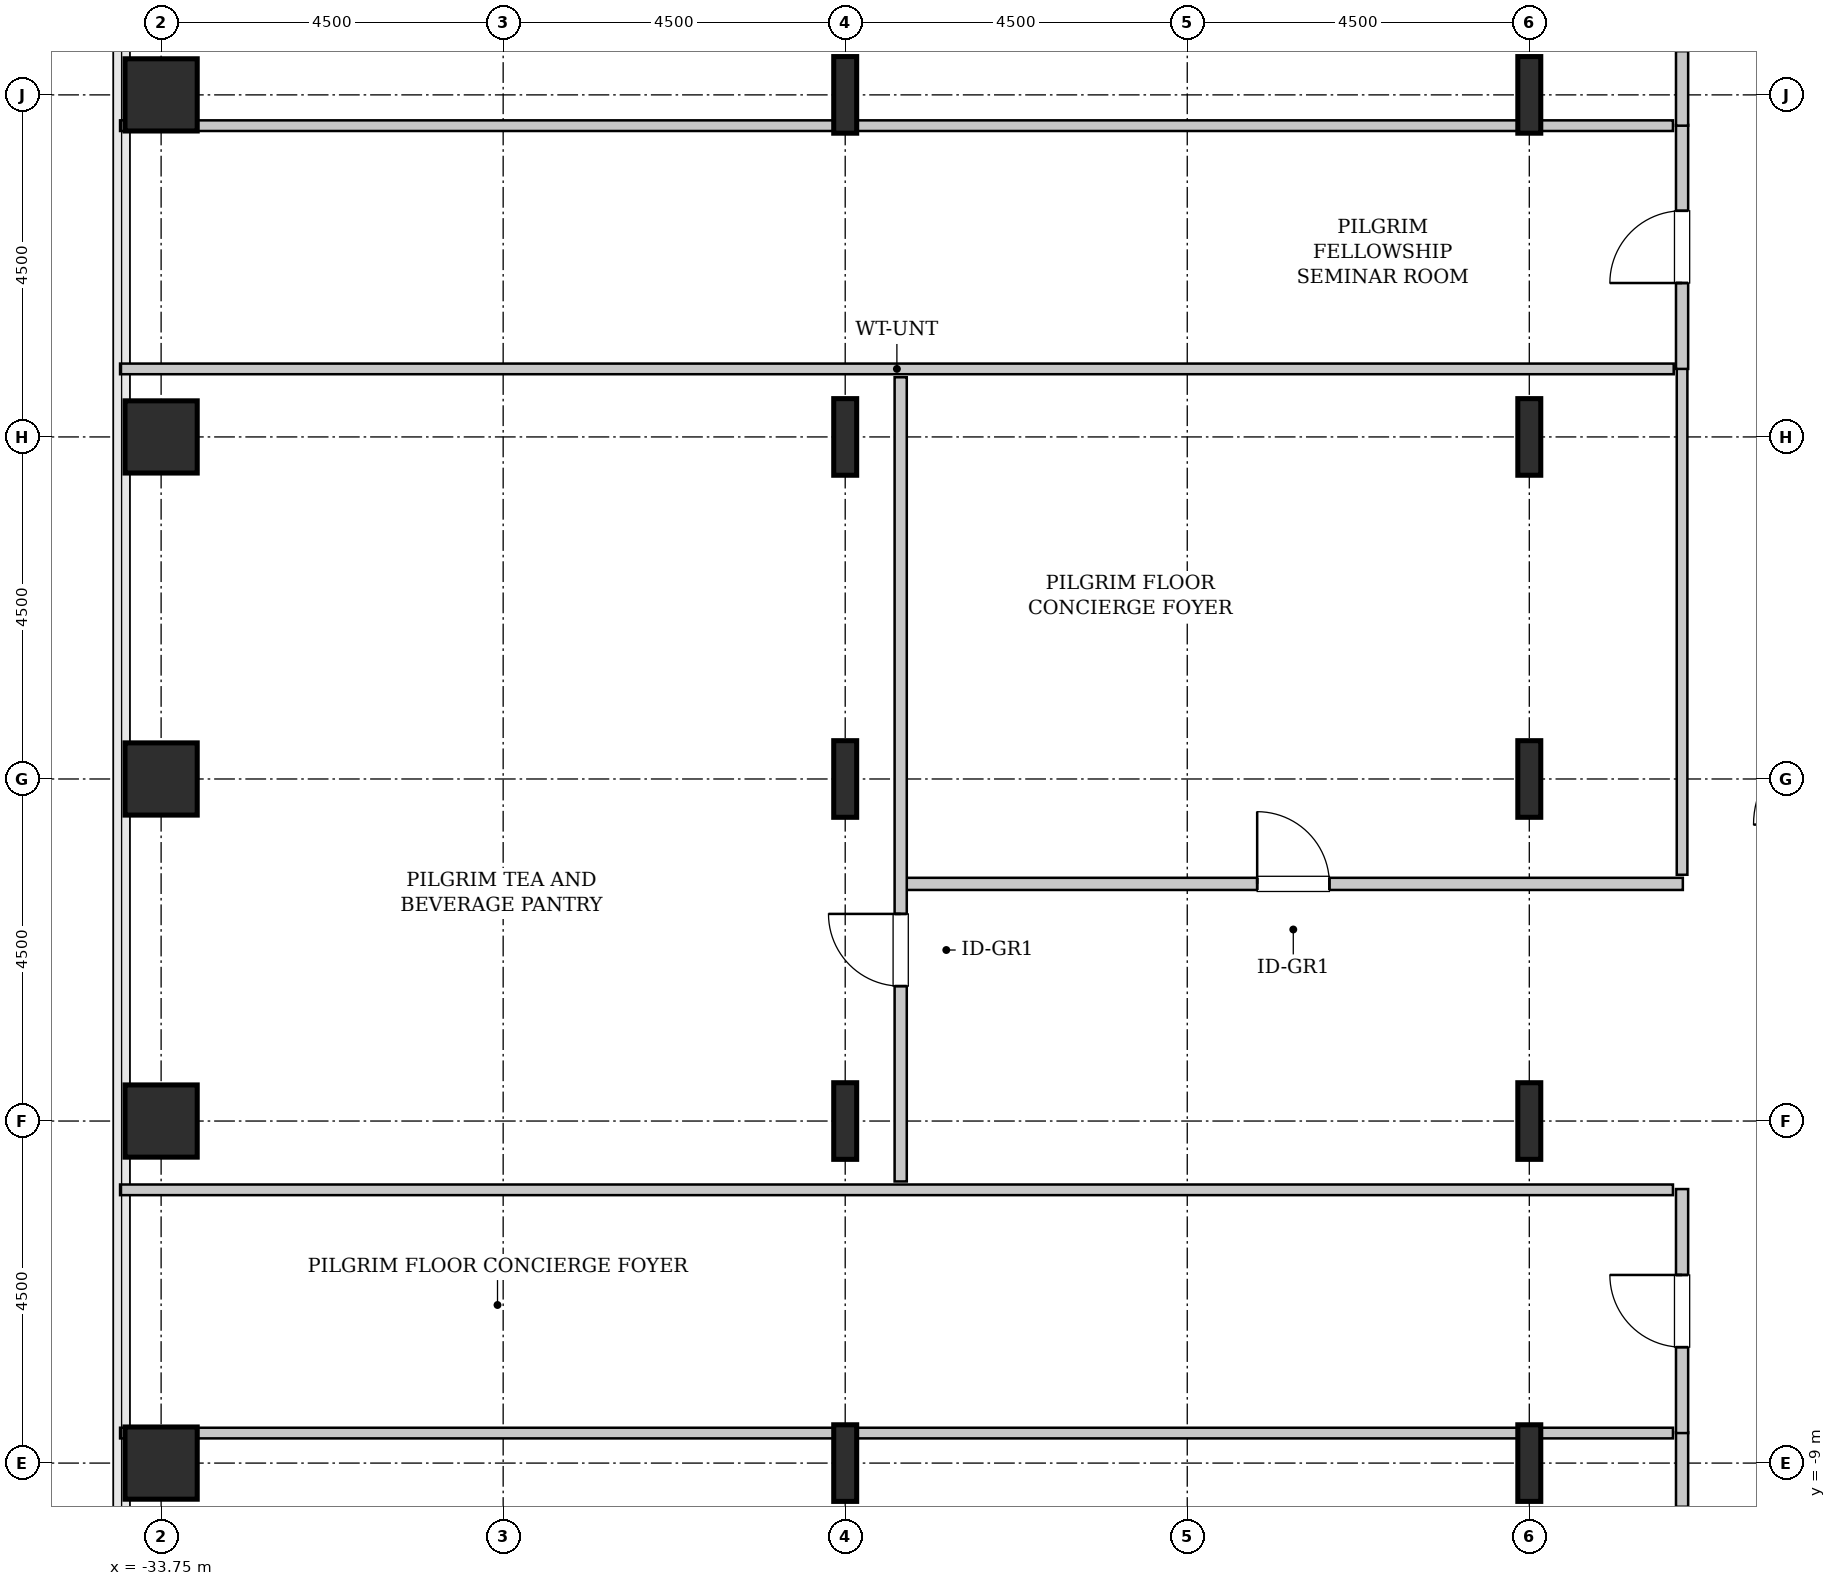
"""IFC4 building model, lengths in metres.
Left out: names, types, materials, properties, quantities, classifications, styles, units other than length and angle.
Written with IfcOpenShell. Run it as: python <this file> out.ifc"""

import sys

from ifc_helpers import new_model, si_unit, direction, frame, frame_2d, origin, origin_2d, place, context, subcontext, project, spatial, rectangle, hollow_rectangle, i_section, extrude, source, transform, mapped, element, fill, save


model = new_model("IFC4")
c1 = context("Model", 3, precision=1e-05, world=origin(), true_north=direction((0.0, 1.0)))
c2 = subcontext(c1, "Body", "Model", "MODEL_VIEW")
j1 = project(units=[si_unit("LENGTHUNIT", "METRE"), si_unit("PLANEANGLEUNIT", "RADIAN")], contexts=[c1])
p1 = place(None, origin())
s1 = spatial("IfcSite", under=j1, at=p1, CompositionType="ELEMENT")
p2 = place(p1, origin())
s2 = spatial("IfcBuilding", under=s1, at=p2, CompositionType="ELEMENT")
p3 = place(p2, frame((0.0, 0.0, 74.8)))
s3 = spatial("IfcBuildingStorey", under=s2, at=p3, CompositionType="ELEMENT", Elevation=74.8)
m1 = source(origin(), c2, "Body", "SweptSolid", [
    extrude(hollow_rectangle(XDim=0.95, YDim=0.95, WallThickness=0.045, InnerFilletRadius=0.045, OuterFilletRadius=0.09, at=origin_2d()), origin(), (0.0, 0.0, 1.0), 3.8),
])
for number, where, z_axis, x_axis in (
    (1, (-33.75, -9.0, 0.0), (0.0, 0.0, 1.0), (1.0, 0.0, 0.0)),
    (2, (-33.75, -4.5, 0.0), (0.0, 0.0, 1.0), (1.0, 0.0, 0.0)),
    (3, (-33.75, 0.0, 0.0), (0.0, 0.0, 1.0), (1.0, 0.0, 0.0)),
    (4, (-33.75, 4.5, 0.0), (0.0, 0.0, 1.0), (1.0, 0.0, 0.0)),
    (5, (-33.75, 9.0, 0.0), (0.0, 0.0, 1.0), (1.0, 0.0, 0.0)),
):
    element("IfcColumn", number, at=place(p3, frame(where, z_axis=z_axis, x_axis=x_axis)), inside=s3, PredefinedType="COLUMN", context=c2, shape_type="MappedRepresentation", body=[
        mapped(m1, transform((0.0, 0.0, 0.0), x_axis=(1.0, 0.0, 0.0), y_axis=(0.0, 1.0, 0.0), z_axis=(0.0, 0.0, 1.0), scale=1.0)),
    ])
m2 = source(origin(), c2, "Body", "SweptSolid", [
    extrude(i_section(OverallWidth=0.302, OverallDepth=1.008, WebThickness=0.021, FlangeThickness=0.04, FilletRadius=0.03, at=origin_2d()), origin(), (0.0, 0.0, 1.0), 3.8),
])
for number, where, z_axis, x_axis in (
    (6, (-24.75, -9.0, 0.0), (0.0, 0.0, 1.0), (1.0, 0.0, 0.0)),
    (7, (-24.75, -4.5, 0.0), (0.0, 0.0, 1.0), (1.0, 0.0, 0.0)),
    (8, (-24.75, 0.0, 0.0), (0.0, 0.0, 1.0), (1.0, 0.0, 0.0)),
    (9, (-24.75, 4.5, 0.0), (0.0, 0.0, 1.0), (1.0, 0.0, 0.0)),
    (10, (-24.75, 9.0, 0.0), (0.0, 0.0, 1.0), (1.0, 0.0, 0.0)),
    (11, (-15.75, -9.0, 0.0), (0.0, 0.0, 1.0), (1.0, 0.0, 0.0)),
    (12, (-15.75, -4.5, 0.0), (0.0, 0.0, 1.0), (1.0, 0.0, 0.0)),
    (13, (-15.75, 0.0, 0.0), (0.0, 0.0, 1.0), (1.0, 0.0, 0.0)),
    (14, (-15.75, 4.5, 0.0), (0.0, 0.0, 1.0), (1.0, 0.0, 0.0)),
    (15, (-15.75, 9.0, 0.0), (0.0, 0.0, 1.0), (1.0, 0.0, 0.0)),
):
    element("IfcColumn", number, at=place(p3, frame(where, z_axis=z_axis, x_axis=x_axis)), inside=s3, PredefinedType="COLUMN", context=c2, shape_type="MappedRepresentation", body=[
        mapped(m2, transform((0.0, 0.0, 0.0), x_axis=(1.0, 0.0, 0.0), y_axis=(0.0, 1.0, 0.0), z_axis=(0.0, 0.0, 1.0), scale=1.0)),
    ])
m3 = source(origin(), c2, "Body", "SweptSolid", [
    extrude(rectangle(XDim=12.645, YDim=0.16, at=frame_2d((6.323, 0.0))), origin(), (0.0, 0.0, 1.0), 3.535),
])
p4 = place(p3, frame((-13.74, -21.24, 0.0), z_axis=(0.0, 0.0, 1.0), x_axis=(0.0, 1.0, 0.0)))
e16 = element("IfcWall", 16, at=p4, inside=s3, PredefinedType="PARTITIONING", context=c2, shape_type="MappedRepresentation", body=[
    mapped(m3, transform((0.0, 0.0, 0.0), x_axis=(1.0, 0.0, 0.0), y_axis=(0.0, 1.0, 0.0), z_axis=(0.0, 0.0, 1.0), scale=1.0)),
])
p5 = place(p4, frame((10.712, 0.0, 0.0)))
e17 = element("IfcOpeningElement", 17, at=p5, cuts=e16, PredefinedType="OPENING", context=c2, shape_type="SweptSolid", body=[
    extrude(rectangle(XDim=0.95, YDim=2.1, at=frame_2d((0.475, 1.05))), frame((0.0, 0.09, 0.0), z_axis=(0.0, -1.0, 0.0), x_axis=(1.0, 0.0, 0.0)), (0.0, 0.0, 1.0), 0.18),
])
m4 = source(origin(), c2, "Body", "SweptSolid", [
    extrude(rectangle(XDim=20.43, YDim=0.14, at=frame_2d((10.215, 0.0))), origin(), (0.0, 0.0, 1.0), 2.825),
])
p6 = place(p3, frame((-34.29, -8.605, 0.0), z_axis=(0.0, 0.0, 1.0), x_axis=(1.0, 0.0, 0.0)))
e18 = element("IfcWall", 18, at=p6, inside=s3, PredefinedType="PARTITIONING", context=c2, shape_type="MappedRepresentation", body=[
    mapped(m4, transform((0.0, 0.0, 0.0), x_axis=(1.0, 0.0, 0.0), y_axis=(0.0, 1.0, 0.0), z_axis=(0.0, 0.0, 1.0), scale=1.0)),
])
m5 = source(origin(), c2, "Body", "SweptSolid", [
    extrude(rectangle(XDim=3.21, YDim=0.16, at=frame_2d((1.605, 0.0))), origin(), (0.0, 0.0, 1.0), 3.535),
])
p7 = place(p3, frame((-13.74, -8.605, 0.0), z_axis=(0.0, 0.0, 1.0), x_axis=(0.0, 1.0, 0.0)))
e19 = element("IfcWall", 19, at=p7, inside=s3, PredefinedType="PARTITIONING", context=c2, shape_type="MappedRepresentation", body=[
    mapped(m5, transform((0.0, 0.0, 0.0), x_axis=(1.0, 0.0, 0.0), y_axis=(0.0, 1.0, 0.0), z_axis=(0.0, 0.0, 1.0), scale=1.0)),
])
p8 = place(p7, frame((1.13, 0.0, 0.0)))
e20 = element("IfcOpeningElement", 20, at=p8, cuts=e19, PredefinedType="OPENING", context=c2, shape_type="SweptSolid", body=[
    extrude(rectangle(XDim=0.95, YDim=2.1, at=frame_2d((0.475, 1.05))), frame((0.0, 0.09, 0.0), z_axis=(0.0, -1.0, 0.0), x_axis=(1.0, 0.0, 0.0)), (0.0, 0.0, 1.0), 0.18),
])
m6 = source(origin(), c2, "Body", "SweptSolid", [
    extrude(rectangle(XDim=20.43, YDim=0.14, at=frame_2d((10.215, 0.0))), origin(), (0.0, 0.0, 1.0), 3.535),
])
p9 = place(p3, frame((-34.29, -5.405, 0.0), z_axis=(0.0, 0.0, 1.0), x_axis=(1.0, 0.0, 0.0)))
e21 = element("IfcWall", 21, at=p9, inside=s3, PredefinedType="PARTITIONING", context=c2, shape_type="MappedRepresentation", body=[
    mapped(m6, transform((0.0, 0.0, 0.0), x_axis=(1.0, 0.0, 0.0), y_axis=(0.0, 1.0, 0.0), z_axis=(0.0, 0.0, 1.0), scale=1.0)),
])
m7 = source(origin(), c2, "Body", "SweptSolid", [
    extrude(rectangle(XDim=10.25, YDim=0.16, at=frame_2d((5.125, 0.0))), origin(), (0.0, 0.0, 1.0), 3.535),
])
p10 = place(p3, frame((-23.98, -1.38, 0.0), z_axis=(0.0, 0.0, 1.0), x_axis=(1.0, 0.0, 0.0)))
e22 = element("IfcWall", 22, at=p10, inside=s3, PredefinedType="PARTITIONING", context=c2, shape_type="MappedRepresentation", body=[
    mapped(m7, transform((0.0, 0.0, 0.0), x_axis=(1.0, 0.0, 0.0), y_axis=(0.0, 1.0, 0.0), z_axis=(0.0, 0.0, 1.0), scale=1.0)),
])
p11 = place(p10, frame((4.65, 0.0, 0.0)))
e23 = element("IfcOpeningElement", 23, at=p11, cuts=e22, PredefinedType="OPENING", context=c2, shape_type="SweptSolid", body=[
    extrude(rectangle(XDim=0.95, YDim=2.1, at=frame_2d((0.475, 1.05))), frame((0.0, 0.09, 0.0), z_axis=(0.0, -1.0, 0.0), x_axis=(1.0, 0.0, 0.0)), (0.0, 0.0, 1.0), 0.18),
])
m8 = source(origin(), c2, "Body", "SweptSolid", [
    extrude(rectangle(XDim=6.665, YDim=0.14, at=frame_2d((3.333, 0.0))), origin(), (0.0, 0.0, 1.0), 3.535),
])
p12 = place(p3, frame((-13.74, -1.26, 0.0), z_axis=(0.0, 0.0, 1.0), x_axis=(0.0, 1.0, 0.0)))
e24 = element("IfcWall", 24, at=p12, inside=s3, PredefinedType="PARTITIONING", context=c2, shape_type="MappedRepresentation", body=[
    mapped(m8, transform((0.0, 0.0, 0.0), x_axis=(1.0, 0.0, 0.0), y_axis=(0.0, 1.0, 0.0), z_axis=(0.0, 0.0, 1.0), scale=1.0)),
])
m9 = source(origin(), c2, "Body", "SweptSolid", [
    extrude(rectangle(XDim=20.44, YDim=0.14, at=frame_2d((10.22, 0.0))), origin(), (0.0, 0.0, 1.0), 3.535),
])
p13 = place(p3, frame((-34.29, 5.395, 0.0), z_axis=(0.0, 0.0, 1.0), x_axis=(1.0, 0.0, 0.0)))
e25 = element("IfcWall", 25, at=p13, inside=s3, PredefinedType="PARTITIONING", context=c2, shape_type="MappedRepresentation", body=[
    mapped(m9, transform((0.0, 0.0, 0.0), x_axis=(1.0, 0.0, 0.0), y_axis=(0.0, 1.0, 0.0), z_axis=(0.0, 0.0, 1.0), scale=1.0)),
])
m10 = source(origin(), c2, "Body", "SweptSolid", [
    extrude(rectangle(XDim=10.58, YDim=0.16, at=frame_2d((5.29, 0.0))), origin(), (0.0, 0.0, 1.0), 3.535),
])
p14 = place(p3, frame((-24.02, -5.295, 0.0), z_axis=(0.0, 0.0, 1.0), x_axis=(0.0, 1.0, 0.0)))
e26 = element("IfcWall", 26, at=p14, inside=s3, PredefinedType="PARTITIONING", context=c2, shape_type="MappedRepresentation", body=[
    mapped(m10, transform((0.0, 0.0, 0.0), x_axis=(1.0, 0.0, 0.0), y_axis=(0.0, 1.0, 0.0), z_axis=(0.0, 0.0, 1.0), scale=1.0)),
])
p15 = place(p14, frame((2.57, 0.0, 0.0)))
e27 = element("IfcOpeningElement", 27, at=p15, cuts=e26, PredefinedType="OPENING", context=c2, shape_type="SweptSolid", body=[
    extrude(rectangle(XDim=0.95, YDim=2.1, at=frame_2d((0.475, 1.05))), frame((0.0, 0.09, 0.0), z_axis=(0.0, -1.0, 0.0), x_axis=(1.0, 0.0, 0.0)), (0.0, 0.0, 1.0), 0.18),
])
p16 = place(p3, frame((-13.74, 5.395, 0.0), z_axis=(0.0, 0.0, 1.0), x_axis=(0.0, 1.0, 0.0)))
e28 = element("IfcWall", 28, at=p16, inside=s3, PredefinedType="PARTITIONING", context=c2, shape_type="MappedRepresentation", body=[
    mapped(m5, transform((0.0, 0.0, 0.0), x_axis=(1.0, 0.0, 0.0), y_axis=(0.0, 1.0, 0.0), z_axis=(0.0, 0.0, 1.0), scale=1.0)),
])
p17 = place(p16, frame((1.13, 0.0, 0.0)))
e29 = element("IfcOpeningElement", 29, at=p17, cuts=e28, PredefinedType="OPENING", context=c2, shape_type="SweptSolid", body=[
    extrude(rectangle(XDim=0.95, YDim=2.1, at=frame_2d((0.475, 1.05))), frame((0.0, 0.09, 0.0), z_axis=(0.0, -1.0, 0.0), x_axis=(1.0, 0.0, 0.0)), (0.0, 0.0, 1.0), 0.18),
])
p18 = place(p3, frame((-34.29, 8.595, 0.0), z_axis=(0.0, 0.0, 1.0), x_axis=(1.0, 0.0, 0.0)))
e30 = element("IfcWall", 30, at=p18, inside=s3, PredefinedType="PARTITIONING", context=c2, shape_type="MappedRepresentation", body=[
    mapped(m4, transform((0.0, 0.0, 0.0), x_axis=(1.0, 0.0, 0.0), y_axis=(0.0, 1.0, 0.0), z_axis=(0.0, 0.0, 1.0), scale=1.0)),
])
p19 = place(p3, frame((-13.74, 8.595, 0.0), z_axis=(0.0, 0.0, 1.0), x_axis=(0.0, 1.0, 0.0)))
e31 = element("IfcWall", 31, at=p19, inside=s3, PredefinedType="PARTITIONING", context=c2, shape_type="MappedRepresentation", body=[
    mapped(m3, transform((0.0, 0.0, 0.0), x_axis=(1.0, 0.0, 0.0), y_axis=(0.0, 1.0, 0.0), z_axis=(0.0, 0.0, 1.0), scale=1.0)),
])
p20 = place(p19, frame((0.982, 0.0, 0.0)))
e32 = element("IfcOpeningElement", 32, at=p20, cuts=e31, PredefinedType="OPENING", context=c2, shape_type="SweptSolid", body=[
    extrude(rectangle(XDim=0.95, YDim=2.1, at=frame_2d((0.475, 1.05))), frame((0.0, 0.09, 0.0), z_axis=(0.0, -1.0, 0.0), x_axis=(1.0, 0.0, 0.0)), (0.0, 0.0, 1.0), 0.18),
])
m11 = source(origin(), c2, "Body", "SweptSolid", [
    extrude(rectangle(XDim=0.95, YDim=2.1, at=frame_2d((0.475, 1.05))), frame((0.0, 0.025, 0.0), z_axis=(0.0, -1.0, 0.0), x_axis=(1.0, 0.0, 0.0)), (0.0, 0.0, 1.0), 0.05),
])
p21 = place(p8, origin())
e33 = element("IfcDoor", 33, at=p21, inside=s3, OperationType="SINGLE_SWING_RIGHT", PredefinedType="DOOR", context=c2, shape_type="MappedRepresentation", body=[
    mapped(m11, transform((0.0, 0.0, 0.0), x_axis=(1.0, 0.0, 0.0), y_axis=(0.0, 1.0, 0.0), z_axis=(0.0, 0.0, 1.0), scale=1.0)),
])
fill(e20, e33)
p22 = place(p11, origin())
e34 = element("IfcDoor", 34, at=p22, inside=s3, OperationType="SINGLE_SWING_LEFT", PredefinedType="DOOR", context=c2, shape_type="MappedRepresentation", body=[
    mapped(m11, transform((0.0, 0.0, 0.0), x_axis=(1.0, 0.0, 0.0), y_axis=(0.0, 1.0, 0.0), z_axis=(0.0, 0.0, 1.0), scale=1.0)),
])
fill(e23, e34)
p23 = place(p15, origin())
e35 = element("IfcDoor", 35, at=p23, inside=s3, OperationType="SINGLE_SWING_RIGHT", PredefinedType="DOOR", context=c2, shape_type="MappedRepresentation", body=[
    mapped(m11, transform((0.0, 0.0, 0.0), x_axis=(1.0, 0.0, 0.0), y_axis=(0.0, 1.0, 0.0), z_axis=(0.0, 0.0, 1.0), scale=1.0)),
])
fill(e27, e35)
p24 = place(p17, origin())
e36 = element("IfcDoor", 36, at=p24, inside=s3, OperationType="SINGLE_SWING_LEFT", PredefinedType="DOOR", context=c2, shape_type="MappedRepresentation", body=[
    mapped(m11, transform((0.0, 0.0, 0.0), x_axis=(1.0, 0.0, 0.0), y_axis=(0.0, 1.0, 0.0), z_axis=(0.0, 0.0, 1.0), scale=1.0)),
])
fill(e29, e36)
save(model, sys.argv[1])
